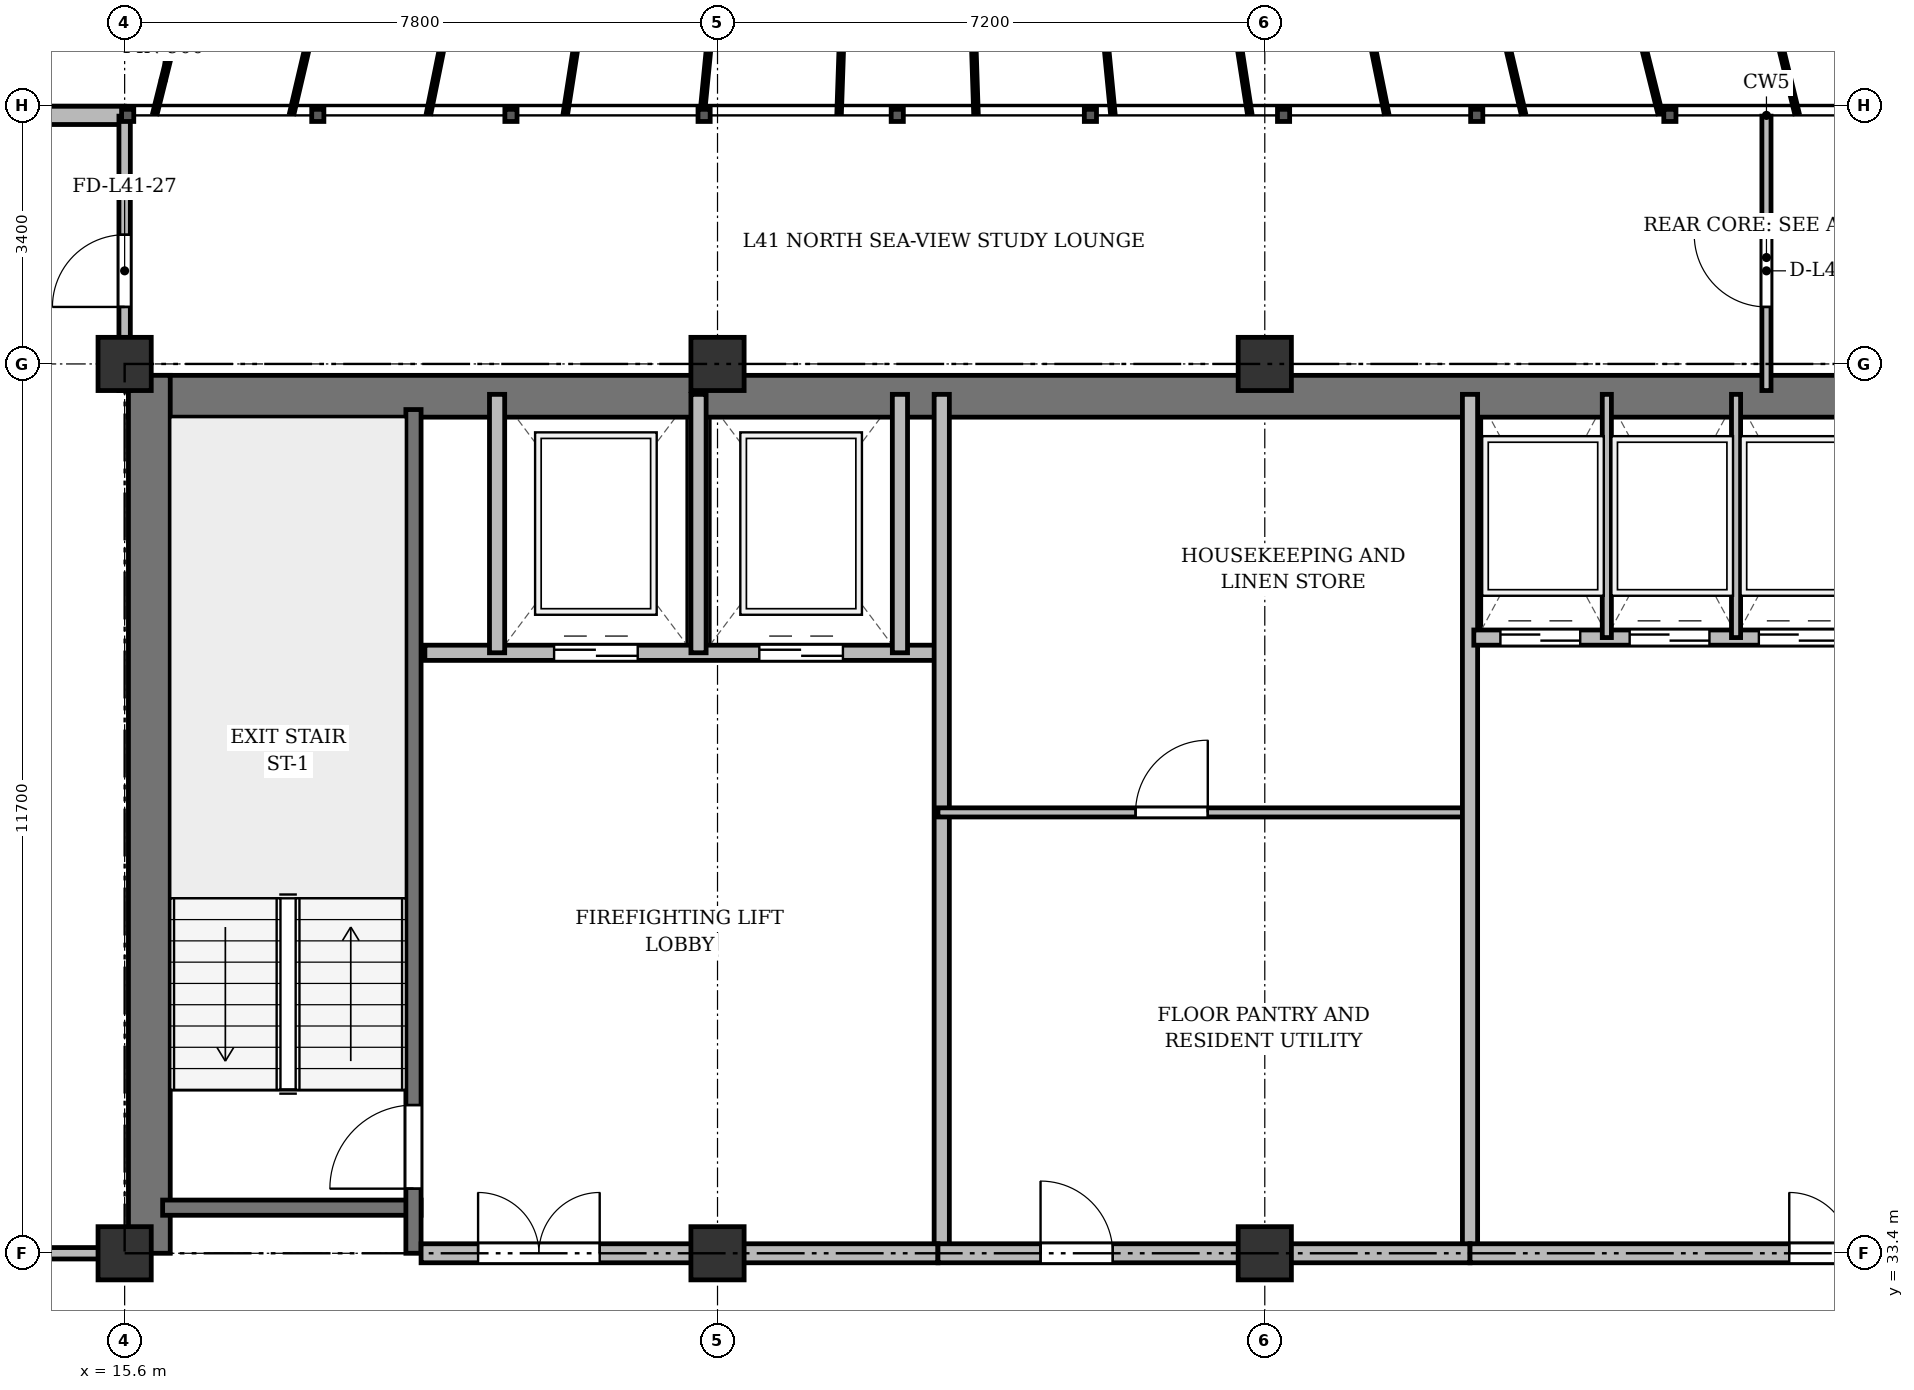
"""IFC4 building model, lengths in metres.
Left out: names, types, materials, properties, quantities, classifications, styles, units other than length and angle.
Written with IfcOpenShell. Run it as: python <this file> out.ifc"""

import sys

from ifc_helpers import new_model, si_unit, direction, frame, frame_2d, origin, origin_2d, place, context, subcontext, project, spatial, rectangle, extrude, source, transform, mapped, element, fill, save


model = new_model("IFC4")
c1 = context("Model", 3, precision=1e-05, world=origin(), true_north=direction((0.0, 1.0)))
c2 = subcontext(c1, "Body", "Model", "MODEL_VIEW")
j1 = project(units=[si_unit("LENGTHUNIT", "METRE"), si_unit("PLANEANGLEUNIT", "RADIAN")], contexts=[c1])
p1 = place(None, origin())
s1 = spatial("IfcSite", under=j1, at=p1, CompositionType="ELEMENT")
p2 = place(p1, origin())
s2 = spatial("IfcBuilding", under=s1, at=p2, CompositionType="ELEMENT")
p3 = place(p2, frame((0.0, 0.0, 157.3)))
s3 = spatial("IfcBuildingStorey", under=s2, at=p3, CompositionType="ELEMENT", Elevation=157.3)
m1 = source(origin(), c2, "Body", "SweptSolid", [
    extrude(rectangle(XDim=0.7, YDim=0.7, at=origin_2d()), origin(), (0.0, 0.0, 1.0), 3.6),
])
for number, where, z_axis, x_axis in (
    (1, (15.6, 33.4, 0.0), (0.0, 0.0, 1.0), (1.0, 0.0, 0.0)),
    (2, (15.6, 45.1, 0.0), (0.0, 0.0, 1.0), (1.0, 0.0, 0.0)),
    (3, (23.4, 33.4, 0.0), (0.0, 0.0, 1.0), (1.0, 0.0, 0.0)),
    (4, (23.4, 45.1, 0.0), (0.0, 0.0, 1.0), (1.0, 0.0, 0.0)),
    (5, (30.6, 33.4, 0.0), (0.0, 0.0, 1.0), (1.0, 0.0, 0.0)),
    (6, (30.6, 45.1, 0.0), (0.0, 0.0, 1.0), (1.0, 0.0, 0.0)),
):
    element("IfcColumn", number, at=place(p3, frame(where, z_axis=z_axis, x_axis=x_axis)), inside=s3, PredefinedType="COLUMN", context=c2, shape_type="MappedRepresentation", body=[
        mapped(m1, transform((0.0, 0.0, 0.0), x_axis=(1.0, 0.0, 0.0), y_axis=(0.0, 1.0, 0.0), z_axis=(0.0, 0.0, 1.0), scale=1.0)),
    ])
p4 = place(p3, frame((10.9, 48.37, 0.0), z_axis=(0.0, 0.0, 1.0), x_axis=(1.0, 0.0, 0.0)))
e7 = element("IfcWall", 7, at=p4, inside=s3, PredefinedType="SOLIDWALL", context=c2, shape_type="SweptSolid", body=[
    extrude(rectangle(XDim=4.7, YDim=0.24, at=frame_2d((2.35, 0.0))), origin(), (0.0, 0.0, 1.0), 3.35),
])
p5 = place(p4, frame((1.675, 0.0, 0.9)))
e8 = element("IfcOpeningElement", 8, at=p5, cuts=e7, PredefinedType="OPENING", context=c2, shape_type="SweptSolid", body=[
    extrude(rectangle(XDim=1.35, YDim=1.5, at=frame_2d((0.675, 0.75))), frame((0.0, 0.13, 0.0), z_axis=(0.0, -1.0, 0.0), x_axis=(1.0, 0.0, 0.0)), (0.0, 0.0, 1.0), 0.26),
])
p6 = place(p3, frame((15.65, 44.675, 0.0), z_axis=(0.0, 0.0, 1.0), x_axis=(1.0, 0.0, 0.0)))
e9 = element("IfcWall", 9, at=p6, inside=s3, PredefinedType="SHEAR", context=c2, shape_type="SweptSolid", body=[
    extrude(rectangle(XDim=43.1, YDim=0.55, at=frame_2d((21.55, 0.0))), origin(), (0.0, 0.0, 1.0), 3.35),
])
p7 = place(p3, frame((15.925, 33.4, 0.0), z_axis=(0.0, 0.0, 1.0), x_axis=(0.0, 1.0, 0.0)))
e10 = element("IfcWall", 10, at=p7, inside=s3, PredefinedType="SHEAR", context=c2, shape_type="SweptSolid", body=[
    extrude(rectangle(XDim=11.55, YDim=0.55, at=frame_2d((5.775, 0.0))), origin(), (0.0, 0.0, 1.0), 3.35),
])
p8 = place(p3, frame((16.1, 34.0, 0.0), z_axis=(0.0, 0.0, 1.0), x_axis=(1.0, 0.0, 0.0)))
e11 = element("IfcWall", 11, at=p8, inside=s3, PredefinedType="SHEAR", context=c2, shape_type="SweptSolid", body=[
    extrude(rectangle(XDim=3.4, YDim=0.2, at=frame_2d((1.7, 0.0))), origin(), (0.0, 0.0, 1.0), 3.35),
])
p9 = place(p3, frame((19.4, 33.4, 0.0), z_axis=(0.0, 0.0, 1.0), x_axis=(0.0, 1.0, 0.0)))
e12 = element("IfcWall", 12, at=p9, inside=s3, PredefinedType="SHEAR", context=c2, shape_type="SweptSolid", body=[
    extrude(rectangle(XDim=11.1, YDim=0.2, at=frame_2d((5.55, 0.0))), origin(), (0.0, 0.0, 1.0), 3.35),
])
p10 = place(p9, frame((0.85, 0.0, 0.0)))
e13 = element("IfcOpeningElement", 13, at=p10, cuts=e12, PredefinedType="OPENING", context=c2, shape_type="SweptSolid", body=[
    extrude(rectangle(XDim=1.1, YDim=2.15, at=frame_2d((0.55, 1.075))), frame((0.0, 0.11, 0.0), z_axis=(0.0, -1.0, 0.0), x_axis=(1.0, 0.0, 0.0)), (0.0, 0.0, 1.0), 0.22),
])
p11 = place(p3, frame((19.55, 41.3, 0.0), z_axis=(0.0, 0.0, 1.0), x_axis=(1.0, 0.0, 0.0)))
e14 = element("IfcWall", 14, at=p11, inside=s3, PredefinedType="SOLIDWALL", context=c2, shape_type="SweptSolid", body=[
    extrude(rectangle(XDim=6.75, YDim=0.2, at=frame_2d((3.375, 0.0))), origin(), (0.0, 0.0, 1.0), 3.35),
])
p12 = place(p11, frame((1.7, 0.0, 0.0)))
e15 = element("IfcOpeningElement", 15, at=p12, cuts=e14, PredefinedType="OPENING", context=c2, shape_type="SweptSolid", body=[
    extrude(rectangle(XDim=1.1, YDim=2.15, at=frame_2d((0.55, 1.075))), frame((0.0, 0.11, 0.0), z_axis=(0.0, -1.0, 0.0), x_axis=(1.0, 0.0, 0.0)), (0.0, 0.0, 1.0), 0.22),
])
p13 = place(p11, frame((4.4, 0.0, 0.0)))
e16 = element("IfcOpeningElement", 16, at=p13, cuts=e14, PredefinedType="OPENING", context=c2, shape_type="SweptSolid", body=[
    extrude(rectangle(XDim=1.1, YDim=2.15, at=frame_2d((0.55, 1.075))), frame((0.0, 0.11, 0.0), z_axis=(0.0, -1.0, 0.0), x_axis=(1.0, 0.0, 0.0)), (0.0, 0.0, 1.0), 0.22),
])
for number, where, z_axis, x_axis in (
    (17, (20.5, 41.3, 0.0), (0.0, 0.0, 1.0), (0.0, 1.0, 0.0)),
    (18, (23.15, 41.3, 0.0), (0.0, 0.0, 1.0), (0.0, 1.0, 0.0)),
    (19, (25.8, 41.3, 0.0), (0.0, 0.0, 1.0), (0.0, 1.0, 0.0)),
):
    element("IfcWall", number, at=place(p3, frame(where, z_axis=z_axis, x_axis=x_axis)), inside=s3, PredefinedType="SOLIDWALL", context=c2, shape_type="SweptSolid", body=[
        extrude(rectangle(XDim=3.4, YDim=0.2, at=frame_2d((1.7, 0.0))), origin(), (0.0, 0.0, 1.0), 3.35),
    ])
p14 = place(p3, frame((26.35, 33.4, 0.0), z_axis=(0.0, 0.0, 1.0), x_axis=(0.0, 1.0, 0.0)))
e20 = element("IfcWall", 20, at=p14, inside=s3, PredefinedType="SOLIDWALL", context=c2, shape_type="SweptSolid", body=[
    extrude(rectangle(XDim=11.3, YDim=0.2, at=frame_2d((5.65, 0.0))), origin(), (0.0, 0.0, 1.0), 2.75),
])
p15 = place(p3, frame((19.5, 33.4, 0.0), z_axis=(0.0, 0.0, 1.0), x_axis=(1.0, 0.0, 0.0)))
e21 = element("IfcWall", 21, at=p15, inside=s3, PredefinedType="PARTITIONING", context=c2, shape_type="SweptSolid", body=[
    extrude(rectangle(XDim=6.8, YDim=0.25, at=frame_2d((3.4, 0.0))), origin(), (0.0, 0.0, 1.0), 2.75),
])
p16 = place(p15, frame((0.75, 0.0, 0.0)))
e22 = element("IfcOpeningElement", 22, at=p16, cuts=e21, PredefinedType="OPENING", context=c2, shape_type="SweptSolid", body=[
    extrude(rectangle(XDim=1.6, YDim=2.2, at=frame_2d((0.8, 1.1))), frame((0.0, 0.135, 0.0), z_axis=(0.0, -1.0, 0.0), x_axis=(1.0, 0.0, 0.0)), (0.0, 0.0, 1.0), 0.27),
])
p17 = place(p3, frame((26.3, 39.2, 0.0), z_axis=(0.0, 0.0, 1.0), x_axis=(1.0, 0.0, 0.0)))
e23 = element("IfcWall", 23, at=p17, inside=s3, PredefinedType="PARTITIONING", context=c2, shape_type="SweptSolid", body=[
    extrude(rectangle(XDim=7.0, YDim=0.12, at=frame_2d((3.5, 0.0))), origin(), (0.0, 0.0, 1.0), 2.85),
])
p18 = place(p17, frame((2.6, 0.0, 0.0)))
e24 = element("IfcOpeningElement", 24, at=p18, cuts=e23, PredefinedType="OPENING", context=c2, shape_type="SweptSolid", body=[
    extrude(rectangle(XDim=0.95, YDim=2.15, at=frame_2d((0.475, 1.075))), frame((0.0, 0.07, 0.0), z_axis=(0.0, -1.0, 0.0), x_axis=(1.0, 0.0, 0.0)), (0.0, 0.0, 1.0), 0.14),
])
p19 = place(p3, frame((33.3, 33.4, 0.0), z_axis=(0.0, 0.0, 1.0), x_axis=(0.0, 1.0, 0.0)))
e25 = element("IfcWall", 25, at=p19, inside=s3, PredefinedType="SOLIDWALL", context=c2, shape_type="SweptSolid", body=[
    extrude(rectangle(XDim=11.3, YDim=0.2, at=frame_2d((5.65, 0.0))), origin(), (0.0, 0.0, 1.0), 2.75),
])
p20 = place(p3, frame((33.35, 41.5, 0.0), z_axis=(0.0, 0.0, 1.0), x_axis=(1.0, 0.0, 0.0)))
e26 = element("IfcWall", 26, at=p20, inside=s3, PredefinedType="SOLIDWALL", context=c2, shape_type="SweptSolid", body=[
    extrude(rectangle(XDim=6.9, YDim=0.2, at=frame_2d((3.45, 0.0))), origin(), (0.0, 0.0, 1.0), 3.35),
])
p21 = place(p20, frame((0.35, 0.0, 0.0)))
e27 = element("IfcOpeningElement", 27, at=p21, cuts=e26, PredefinedType="OPENING", context=c2, shape_type="SweptSolid", body=[
    extrude(rectangle(XDim=1.05, YDim=2.15, at=frame_2d((0.525, 1.075))), frame((0.0, 0.11, 0.0), z_axis=(0.0, -1.0, 0.0), x_axis=(1.0, 0.0, 0.0)), (0.0, 0.0, 1.0), 0.22),
])
p22 = place(p20, frame((2.05, 0.0, 0.0)))
e28 = element("IfcOpeningElement", 28, at=p22, cuts=e26, PredefinedType="OPENING", context=c2, shape_type="SweptSolid", body=[
    extrude(rectangle(XDim=1.05, YDim=2.15, at=frame_2d((0.525, 1.075))), frame((0.0, 0.11, 0.0), z_axis=(0.0, -1.0, 0.0), x_axis=(1.0, 0.0, 0.0)), (0.0, 0.0, 1.0), 0.22),
])
p23 = place(p20, frame((3.75, 0.0, 0.0)))
e29 = element("IfcOpeningElement", 29, at=p23, cuts=e26, PredefinedType="OPENING", context=c2, shape_type="SweptSolid", body=[
    extrude(rectangle(XDim=1.05, YDim=2.15, at=frame_2d((0.525, 1.075))), frame((0.0, 0.11, 0.0), z_axis=(0.0, -1.0, 0.0), x_axis=(1.0, 0.0, 0.0)), (0.0, 0.0, 1.0), 0.22),
])
p24 = place(p20, frame((5.45, 0.0, 0.0)))
e30 = element("IfcOpeningElement", 30, at=p24, cuts=e26, PredefinedType="OPENING", context=c2, shape_type="SweptSolid", body=[
    extrude(rectangle(XDim=1.05, YDim=2.15, at=frame_2d((0.525, 1.075))), frame((0.0, 0.11, 0.0), z_axis=(0.0, -1.0, 0.0), x_axis=(1.0, 0.0, 0.0)), (0.0, 0.0, 1.0), 0.22),
])
for number, where, z_axis, x_axis in (
    (31, (35.1, 41.5, 0.0), (0.0, 0.0, 1.0), (0.0, 1.0, 0.0)),
    (32, (36.8, 41.5, 0.0), (0.0, 0.0, 1.0), (0.0, 1.0, 0.0)),
):
    element("IfcWall", number, at=place(p3, frame(where, z_axis=z_axis, x_axis=x_axis)), inside=s3, PredefinedType="PARTITIONING", context=c2, shape_type="SweptSolid", body=[
        extrude(rectangle(XDim=3.2, YDim=0.12, at=frame_2d((1.6, 0.0))), origin(), (0.0, 0.0, 1.0), 3.35),
    ])
p25 = place(p3, frame((26.3, 33.4, 0.0), z_axis=(0.0, 0.0, 1.0), x_axis=(1.0, 0.0, 0.0)))
e33 = element("IfcWall", 33, at=p25, inside=s3, PredefinedType="PARTITIONING", context=c2, shape_type="SweptSolid", body=[
    extrude(rectangle(XDim=7.0, YDim=0.25, at=frame_2d((3.5, 0.0))), origin(), (0.0, 0.0, 1.0), 2.75),
])
p26 = place(p25, frame((1.35, 0.0, 0.0)))
e34 = element("IfcOpeningElement", 34, at=p26, cuts=e33, PredefinedType="OPENING", context=c2, shape_type="SweptSolid", body=[
    extrude(rectangle(XDim=0.95, YDim=2.15, at=frame_2d((0.475, 1.075))), frame((0.0, 0.135, 0.0), z_axis=(0.0, -1.0, 0.0), x_axis=(1.0, 0.0, 0.0)), (0.0, 0.0, 1.0), 0.27),
])
p27 = place(p3, frame((33.3, 33.4, 0.0), z_axis=(0.0, 0.0, 1.0), x_axis=(1.0, 0.0, 0.0)))
e35 = element("IfcWall", 35, at=p27, inside=s3, PredefinedType="PARTITIONING", context=c2, shape_type="SweptSolid", body=[
    extrude(rectangle(XDim=13.85, YDim=0.25, at=frame_2d((6.925, 0.0))), origin(), (0.0, 0.0, 1.0), 2.75),
])
p28 = place(p27, frame((4.2, 0.0, 0.0)))
e36 = element("IfcOpeningElement", 36, at=p28, cuts=e35, PredefinedType="OPENING", context=c2, shape_type="SweptSolid", body=[
    extrude(rectangle(XDim=1.6, YDim=2.2, at=frame_2d((0.8, 1.1))), frame((0.0, 0.135, 0.0), z_axis=(0.0, -1.0, 0.0), x_axis=(1.0, 0.0, 0.0)), (0.0, 0.0, 1.0), 0.27),
])
p29 = place(p3, frame((8.05, 33.4, 0.0), z_axis=(0.0, 0.0, 1.0), x_axis=(1.0, 0.0, 0.0)))
e37 = element("IfcWall", 37, at=p29, inside=s3, PredefinedType="PARTITIONING", context=c2, shape_type="SweptSolid", body=[
    extrude(rectangle(XDim=7.55, YDim=0.15, at=frame_2d((3.775, 0.0))), origin(), (0.0, 0.0, 1.0), 2.75),
])
p30 = place(p29, frame((3.2, 0.0, 0.0)))
e38 = element("IfcOpeningElement", 38, at=p30, cuts=e37, PredefinedType="OPENING", context=c2, shape_type="SweptSolid", body=[
    extrude(rectangle(XDim=0.95, YDim=2.15, at=frame_2d((0.475, 1.075))), frame((0.0, 0.085, 0.0), z_axis=(0.0, -1.0, 0.0), x_axis=(1.0, 0.0, 0.0)), (0.0, 0.0, 1.0), 0.17),
])
p31 = place(p3, frame((37.2, 44.75, 0.0), z_axis=(0.0, 0.0, 1.0), x_axis=(0.0, 1.0, 0.0)))
e39 = element("IfcWall", 39, at=p31, inside=s3, PredefinedType="PARTITIONING", context=c2, shape_type="SweptSolid", body=[
    extrude(rectangle(XDim=3.61, YDim=0.12, at=frame_2d((1.805, 0.0))), origin(), (0.0, 0.0, 1.0), 2.75),
])
p32 = place(p31, frame((1.1, 0.0, 0.0)))
e40 = element("IfcOpeningElement", 40, at=p32, cuts=e39, PredefinedType="OPENING", context=c2, shape_type="SweptSolid", body=[
    extrude(rectangle(XDim=0.95, YDim=2.15, at=frame_2d((0.475, 1.075))), frame((0.0, 0.07, 0.0), z_axis=(0.0, -1.0, 0.0), x_axis=(1.0, 0.0, 0.0)), (0.0, 0.0, 1.0), 0.14),
])
p33 = place(p3, frame((15.6, 44.75, 0.0), z_axis=(0.0, 0.0, 1.0), x_axis=(0.0, 1.0, 0.0)))
e41 = element("IfcWall", 41, at=p33, inside=s3, PredefinedType="PARTITIONING", context=c2, shape_type="SweptSolid", body=[
    extrude(rectangle(XDim=3.61, YDim=0.15, at=frame_2d((1.805, 0.0))), origin(), (0.0, 0.0, 1.0), 2.85),
])
p34 = place(p33, frame((1.1, 0.0, 0.0)))
e42 = element("IfcOpeningElement", 42, at=p34, cuts=e41, PredefinedType="OPENING", context=c2, shape_type="SweptSolid", body=[
    extrude(rectangle(XDim=0.95, YDim=2.15, at=frame_2d((0.475, 1.075))), frame((0.0, 0.085, 0.0), z_axis=(0.0, -1.0, 0.0), x_axis=(1.0, 0.0, 0.0)), (0.0, 0.0, 1.0), 0.17),
])
m2 = source(origin(), c2, "Body", "SweptSolid", [
    extrude(rectangle(XDim=1.1, YDim=2.15, at=frame_2d((0.55, 1.075))), frame((0.0, 0.025, 0.0), z_axis=(0.0, -1.0, 0.0), x_axis=(1.0, 0.0, 0.0)), (0.0, 0.0, 1.0), 0.05),
])
p35 = place(p10, origin())
e43 = element("IfcDoor", 43, at=p35, inside=s3, OperationType="SINGLE_SWING_LEFT", PredefinedType="DOOR", context=c2, shape_type="MappedRepresentation", body=[
    mapped(m2, transform((0.0, 0.0, 0.0), x_axis=(1.0, 0.0, 0.0), y_axis=(0.0, 1.0, 0.0), z_axis=(0.0, 0.0, 1.0), scale=1.0)),
])
fill(e13, e43)
p36 = place(p12, origin())
e44 = element("IfcDoor", 44, at=p36, inside=s3, OperationType="DOUBLE_DOOR_SLIDING", PredefinedType="DOOR", context=c2, shape_type="MappedRepresentation", body=[
    mapped(m2, transform((0.0, 0.0, 0.0), x_axis=(1.0, 0.0, 0.0), y_axis=(0.0, 1.0, 0.0), z_axis=(0.0, 0.0, 1.0), scale=1.0)),
])
fill(e15, e44)
p37 = place(p13, origin())
e45 = element("IfcDoor", 45, at=p37, inside=s3, OperationType="DOUBLE_DOOR_SLIDING", PredefinedType="DOOR", context=c2, shape_type="MappedRepresentation", body=[
    mapped(m2, transform((0.0, 0.0, 0.0), x_axis=(1.0, 0.0, 0.0), y_axis=(0.0, 1.0, 0.0), z_axis=(0.0, 0.0, 1.0), scale=1.0)),
])
fill(e16, e45)
m3 = source(origin(), c2, "Body", "SweptSolid", [
    extrude(rectangle(XDim=1.6, YDim=2.2, at=frame_2d((0.8, 1.1))), frame((0.0, 0.025, 0.0), z_axis=(0.0, -1.0, 0.0), x_axis=(1.0, 0.0, 0.0)), (0.0, 0.0, 1.0), 0.05),
])
p38 = place(p16, origin())
e46 = element("IfcDoor", 46, at=p38, inside=s3, OperationType="DOUBLE_DOOR_SINGLE_SWING", PredefinedType="DOOR", context=c2, shape_type="MappedRepresentation", body=[
    mapped(m3, transform((0.0, 0.0, 0.0), x_axis=(1.0, 0.0, 0.0), y_axis=(0.0, 1.0, 0.0), z_axis=(0.0, 0.0, 1.0), scale=1.0)),
])
fill(e22, e46)
m4 = source(origin(), c2, "Body", "SweptSolid", [
    extrude(rectangle(XDim=0.95, YDim=2.15, at=frame_2d((0.475, 1.075))), frame((0.0, 0.025, 0.0), z_axis=(0.0, -1.0, 0.0), x_axis=(1.0, 0.0, 0.0)), (0.0, 0.0, 1.0), 0.05),
])
p39 = place(p18, origin())
e47 = element("IfcDoor", 47, at=p39, inside=s3, OperationType="SINGLE_SWING_RIGHT", PredefinedType="DOOR", context=c2, shape_type="MappedRepresentation", body=[
    mapped(m4, transform((0.0, 0.0, 0.0), x_axis=(1.0, 0.0, 0.0), y_axis=(0.0, 1.0, 0.0), z_axis=(0.0, 0.0, 1.0), scale=1.0)),
])
fill(e24, e47)
m5 = source(origin(), c2, "Body", "SweptSolid", [
    extrude(rectangle(XDim=1.05, YDim=2.15, at=frame_2d((0.525, 1.075))), frame((0.0, 0.025, 0.0), z_axis=(0.0, -1.0, 0.0), x_axis=(1.0, 0.0, 0.0)), (0.0, 0.0, 1.0), 0.05),
])
p40 = place(p21, origin())
e48 = element("IfcDoor", 48, at=p40, inside=s3, OperationType="DOUBLE_DOOR_SLIDING", PredefinedType="DOOR", context=c2, shape_type="MappedRepresentation", body=[
    mapped(m5, transform((0.0, 0.0, 0.0), x_axis=(1.0, 0.0, 0.0), y_axis=(0.0, 1.0, 0.0), z_axis=(0.0, 0.0, 1.0), scale=1.0)),
])
fill(e27, e48)
p41 = place(p22, origin())
e49 = element("IfcDoor", 49, at=p41, inside=s3, OperationType="DOUBLE_DOOR_SLIDING", PredefinedType="DOOR", context=c2, shape_type="MappedRepresentation", body=[
    mapped(m5, transform((0.0, 0.0, 0.0), x_axis=(1.0, 0.0, 0.0), y_axis=(0.0, 1.0, 0.0), z_axis=(0.0, 0.0, 1.0), scale=1.0)),
])
fill(e28, e49)
p42 = place(p23, origin())
e50 = element("IfcDoor", 50, at=p42, inside=s3, OperationType="DOUBLE_DOOR_SLIDING", PredefinedType="DOOR", context=c2, shape_type="MappedRepresentation", body=[
    mapped(m5, transform((0.0, 0.0, 0.0), x_axis=(1.0, 0.0, 0.0), y_axis=(0.0, 1.0, 0.0), z_axis=(0.0, 0.0, 1.0), scale=1.0)),
])
fill(e29, e50)
p43 = place(p26, origin())
e51 = element("IfcDoor", 51, at=p43, inside=s3, OperationType="SINGLE_SWING_LEFT", PredefinedType="DOOR", context=c2, shape_type="MappedRepresentation", body=[
    mapped(m4, transform((0.0, 0.0, 0.0), x_axis=(1.0, 0.0, 0.0), y_axis=(0.0, 1.0, 0.0), z_axis=(0.0, 0.0, 1.0), scale=1.0)),
])
fill(e34, e51)
p44 = place(p28, origin())
e52 = element("IfcDoor", 52, at=p44, inside=s3, OperationType="DOUBLE_DOOR_SINGLE_SWING", PredefinedType="DOOR", context=c2, shape_type="MappedRepresentation", body=[
    mapped(m3, transform((0.0, 0.0, 0.0), x_axis=(1.0, 0.0, 0.0), y_axis=(0.0, 1.0, 0.0), z_axis=(0.0, 0.0, 1.0), scale=1.0)),
])
fill(e36, e52)
p45 = place(p32, origin())
e53 = element("IfcDoor", 53, at=p45, inside=s3, OperationType="SINGLE_SWING_RIGHT", PredefinedType="DOOR", context=c2, shape_type="MappedRepresentation", body=[
    mapped(m4, transform((0.0, 0.0, 0.0), x_axis=(1.0, 0.0, 0.0), y_axis=(0.0, 1.0, 0.0), z_axis=(0.0, 0.0, 1.0), scale=1.0)),
])
fill(e40, e53)
p46 = place(p34, origin())
e54 = element("IfcDoor", 54, at=p46, inside=s3, OperationType="SINGLE_SWING_LEFT", PredefinedType="DOOR", context=c2, shape_type="MappedRepresentation", body=[
    mapped(m4, transform((0.0, 0.0, 0.0), x_axis=(1.0, 0.0, 0.0), y_axis=(0.0, 1.0, 0.0), z_axis=(0.0, 0.0, 1.0), scale=1.0)),
])
fill(e42, e54)
save(model, sys.argv[1])
